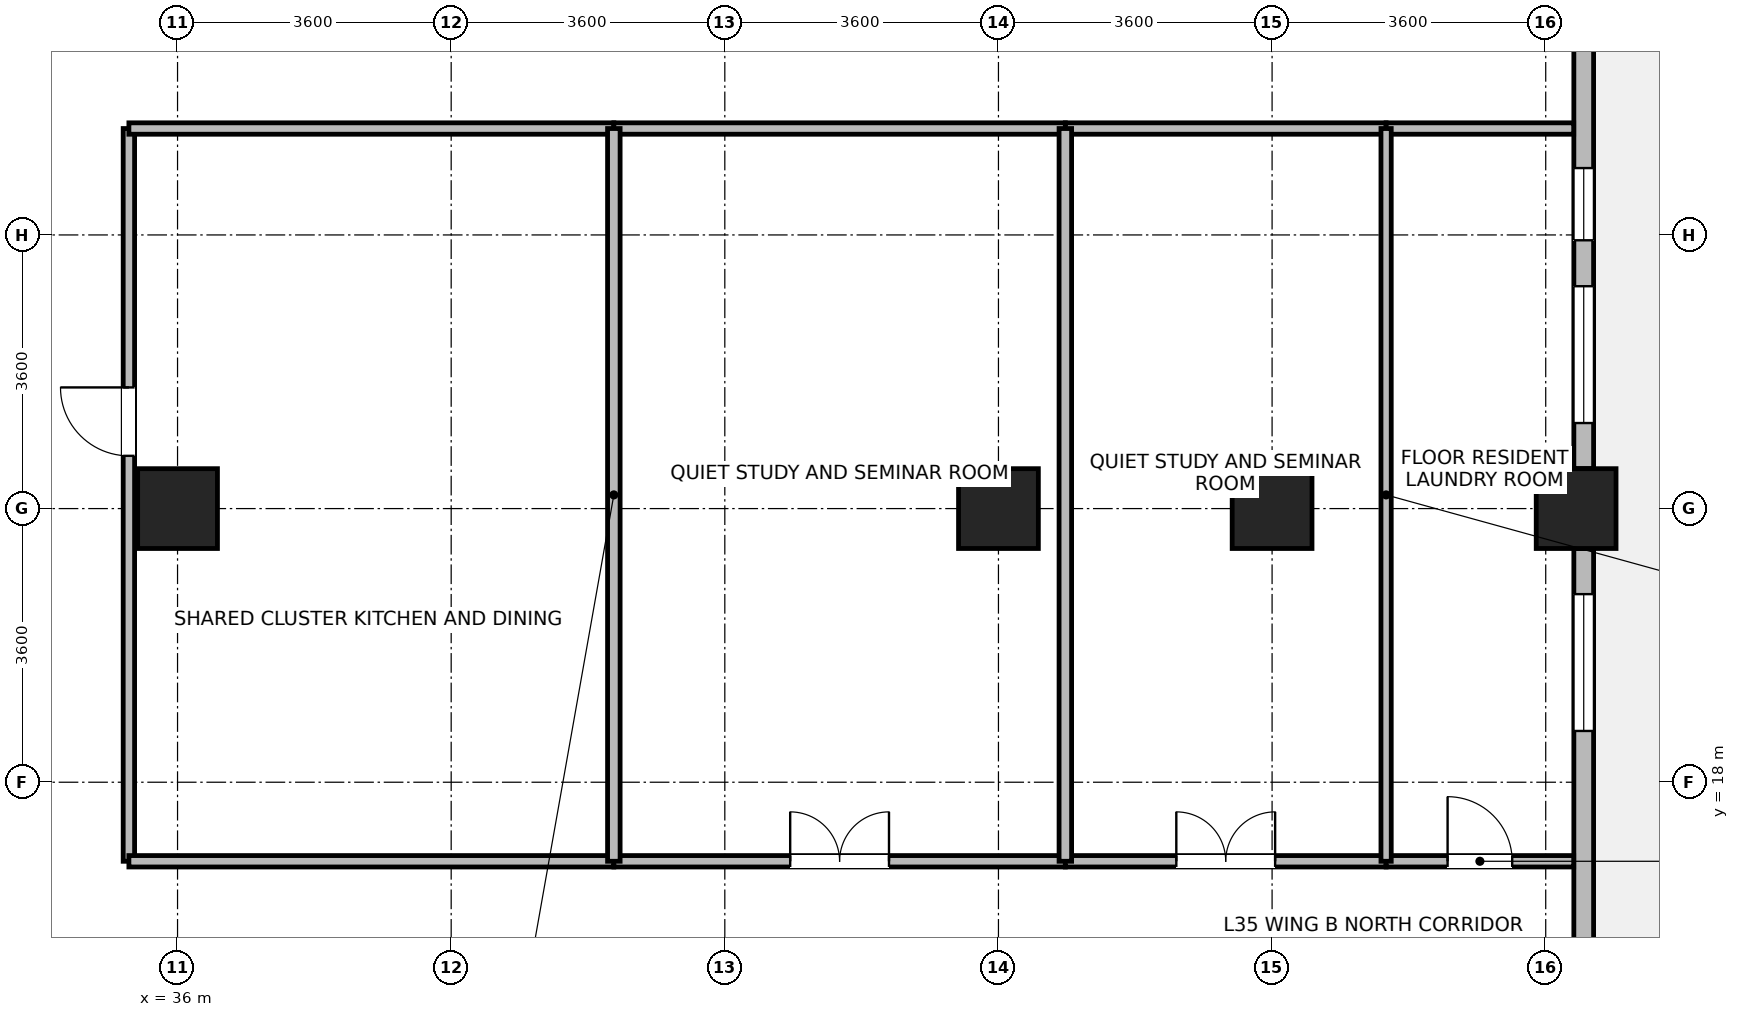
"""IFC4 building model, lengths in metres.
Left out: names, types, materials, properties, quantities, classifications, styles, units other than length and angle.
Written with IfcOpenShell. Run it as: python <this file> out.ifc"""

import sys

from ifc_helpers import new_model, si_unit, direction, frame, frame_2d, origin, origin_2d, place, context, subcontext, project, spatial, rectangle, extrude, source, transform, mapped, element, fill, save


model = new_model("IFC4")
c1 = context("Model", 3, precision=1e-05, world=origin(), true_north=direction((0.0, 1.0)))
c2 = subcontext(c1, "Body", "Model", "MODEL_VIEW")
j1 = project(units=[si_unit("LENGTHUNIT", "METRE"), si_unit("PLANEANGLEUNIT", "RADIAN")], contexts=[c1])
p1 = place(None, origin())
s1 = spatial("IfcSite", under=j1, at=p1, CompositionType="ELEMENT")
p2 = place(p1, origin())
s2 = spatial("IfcBuilding", under=s1, at=p2, CompositionType="ELEMENT")
p3 = place(p2, frame((0.0, 0.0, 140.2)))
s3 = spatial("IfcBuildingStorey", under=s2, at=p3, CompositionType="ELEMENT", Elevation=140.2)
m1 = source(origin(), c2, "Body", "SweptSolid", [
    extrude(rectangle(XDim=1.05, YDim=1.05, at=origin_2d()), origin(), (0.0, 0.0, 1.0), 3.7),
])
for number, where, z_axis, x_axis in (
    (1, (36.0, 21.6, 0.0), (0.0, 0.0, 1.0), (1.0, 0.0, 0.0)),
    (2, (46.8, 21.6, 0.0), (0.0, 0.0, 1.0), (1.0, 0.0, 0.0)),
    (3, (50.4, 21.6, 0.0), (0.0, 0.0, 1.0), (1.0, 0.0, 0.0)),
    (4, (54.4, 21.6, 0.0), (0.0, 0.0, 1.0), (1.0, 0.0, 0.0)),
):
    element("IfcColumn", number, at=place(p3, frame(where, z_axis=z_axis, x_axis=x_axis)), inside=s3, PredefinedType="COLUMN", context=c2, shape_type="MappedRepresentation", body=[
        mapped(m1, transform((0.0, 0.0, 0.0), x_axis=(1.0, 0.0, 0.0), y_axis=(0.0, 1.0, 0.0), z_axis=(0.0, 0.0, 1.0), scale=1.0)),
    ])
p4 = place(p3, frame((54.5, 21.074, 0.0), z_axis=(0.0, 0.0, 1.0), x_axis=(0.0, -1.0, 0.0)))
e5 = element("IfcWall", 5, at=p4, inside=s3, PredefinedType="STANDARD", context=c2, shape_type="SweptSolid", body=[
    extrude(rectangle(XDim=5.998, YDim=0.26, at=frame_2d((2.999, 0.0))), origin(), (0.0, 0.0, 1.0), 2.99),
])
p5 = place(p4, frame((0.6, 0.0, 0.85)))
e6 = element("IfcOpeningElement", 6, at=p5, cuts=e5, PredefinedType="OPENING", context=c2, shape_type="SweptSolid", body=[
    extrude(rectangle(XDim=1.8, YDim=1.85, at=frame_2d((0.9, 0.925))), frame((0.0, 0.14, 0.0), z_axis=(0.0, -1.0, 0.0), x_axis=(1.0, 0.0, 0.0)), (0.0, 0.0, 1.0), 0.28),
])
p6 = place(p3, frame((54.5, 28.124, 0.0), z_axis=(0.0, 0.0, 1.0), x_axis=(0.0, -1.0, 0.0)))
e7 = element("IfcWall", 7, at=p6, inside=s3, PredefinedType="STANDARD", context=c2, shape_type="SweptSolid", body=[
    extrude(rectangle(XDim=5.998, YDim=0.26, at=frame_2d((2.999, 0.0))), origin(), (0.0, 0.0, 1.0), 2.99),
])
p7 = place(p6, frame((3.598, 0.0, 0.85)))
e8 = element("IfcOpeningElement", 8, at=p7, cuts=e7, PredefinedType="OPENING", context=c2, shape_type="SweptSolid", body=[
    extrude(rectangle(XDim=1.8, YDim=1.85, at=frame_2d((0.9, 0.925))), frame((0.0, 0.14, 0.0), z_axis=(0.0, -1.0, 0.0), x_axis=(1.0, 0.0, 0.0)), (0.0, 0.0, 1.0), 0.28),
])
p8 = place(p6, frame((2.044, 0.0, 0.85)))
e9 = element("IfcOpeningElement", 9, at=p8, cuts=e7, PredefinedType="OPENING", context=c2, shape_type="SweptSolid", body=[
    extrude(rectangle(XDim=0.95, YDim=1.75, at=frame_2d((0.475, 0.875))), frame((0.0, 0.14, 0.0), z_axis=(0.0, -1.0, 0.0), x_axis=(1.0, 0.0, 0.0)), (0.0, 0.0, 1.0), 0.28),
])
p9 = place(p3, frame((35.36, 16.96, 0.0), z_axis=(0.0, 0.0, 1.0), x_axis=(0.0, 1.0, 0.0)))
e10 = element("IfcWall", 10, at=p9, inside=s3, PredefinedType="PARTITIONING", context=c2, shape_type="SweptSolid", body=[
    extrude(rectangle(XDim=9.64, YDim=0.15, at=frame_2d((4.82, 0.0))), origin(), (0.0, 0.0, 1.0), 3.44),
])
p10 = place(p9, frame((5.334, 0.0, 0.0)))
e11 = element("IfcOpeningElement", 11, at=p10, cuts=e10, PredefinedType="OPENING", context=c2, shape_type="SweptSolid", body=[
    extrude(rectangle(XDim=0.9, YDim=2.08, at=frame_2d((0.45, 1.04))), frame((0.0, 0.085, 0.0), z_axis=(0.0, -1.0, 0.0), x_axis=(1.0, 0.0, 0.0)), (0.0, 0.0, 1.0), 0.17),
])
for number, where, z_axis, x_axis in (
    (12, (35.36, 16.96, 0.0), (0.0, 0.0, 1.0), (1.0, 0.0, 0.0)),
    (13, (35.36, 26.6, 0.0), (0.0, 0.0, 1.0), (1.0, 0.0, 0.0)),
):
    element("IfcWall", number, at=place(p3, frame(where, z_axis=z_axis, x_axis=x_axis)), inside=s3, PredefinedType="PARTITIONING", context=c2, shape_type="SweptSolid", body=[
        extrude(rectangle(XDim=6.38, YDim=0.15, at=frame_2d((3.19, 0.0))), origin(), (0.0, 0.0, 1.0), 3.44),
    ])
p11 = place(p3, frame((41.74, 16.96, 0.0), z_axis=(0.0, 0.0, 1.0), x_axis=(1.0, 0.0, 0.0)))
e14 = element("IfcWall", 14, at=p11, inside=s3, PredefinedType="PARTITIONING", context=c2, shape_type="SweptSolid", body=[
    extrude(rectangle(XDim=5.94, YDim=0.15, at=frame_2d((2.97, 0.0))), origin(), (0.0, 0.0, 1.0), 3.44),
])
p12 = place(p11, frame((2.32, 0.0, 0.0)))
e15 = element("IfcOpeningElement", 15, at=p12, cuts=e14, PredefinedType="OPENING", context=c2, shape_type="SweptSolid", body=[
    extrude(rectangle(XDim=1.3, YDim=2.12, at=frame_2d((0.65, 1.06))), frame((0.0, 0.085, 0.0), z_axis=(0.0, -1.0, 0.0), x_axis=(1.0, 0.0, 0.0)), (0.0, 0.0, 1.0), 0.17),
])
p13 = place(p3, frame((41.74, 26.6, 0.0), z_axis=(0.0, 0.0, 1.0), x_axis=(1.0, 0.0, 0.0)))
e16 = element("IfcWall", 16, at=p13, inside=s3, PredefinedType="PARTITIONING", context=c2, shape_type="SweptSolid", body=[
    extrude(rectangle(XDim=5.94, YDim=0.15, at=frame_2d((2.97, 0.0))), origin(), (0.0, 0.0, 1.0), 3.44),
])
p14 = place(p3, frame((47.68, 16.96, 0.0), z_axis=(0.0, 0.0, 1.0), x_axis=(1.0, 0.0, 0.0)))
e17 = element("IfcWall", 17, at=p14, inside=s3, PredefinedType="PARTITIONING", context=c2, shape_type="SweptSolid", body=[
    extrude(rectangle(XDim=4.22, YDim=0.15, at=frame_2d((2.11, 0.0))), origin(), (0.0, 0.0, 1.0), 3.44),
])
p15 = place(p14, frame((1.46, 0.0, 0.0)))
e18 = element("IfcOpeningElement", 18, at=p15, cuts=e17, PredefinedType="OPENING", context=c2, shape_type="SweptSolid", body=[
    extrude(rectangle(XDim=1.3, YDim=2.12, at=frame_2d((0.65, 1.06))), frame((0.0, 0.085, 0.0), z_axis=(0.0, -1.0, 0.0), x_axis=(1.0, 0.0, 0.0)), (0.0, 0.0, 1.0), 0.17),
])
p16 = place(p3, frame((47.68, 26.6, 0.0), z_axis=(0.0, 0.0, 1.0), x_axis=(1.0, 0.0, 0.0)))
e19 = element("IfcWall", 19, at=p16, inside=s3, PredefinedType="PARTITIONING", context=c2, shape_type="SweptSolid", body=[
    extrude(rectangle(XDim=4.22, YDim=0.15, at=frame_2d((2.11, 0.0))), origin(), (0.0, 0.0, 1.0), 3.44),
])
p17 = place(p3, frame((51.9, 16.96, 0.0), z_axis=(0.0, 0.0, 1.0), x_axis=(1.0, 0.0, 0.0)))
e20 = element("IfcWall", 20, at=p17, inside=s3, PredefinedType="PARTITIONING", context=c2, shape_type="SweptSolid", body=[
    extrude(rectangle(XDim=2.468, YDim=0.15, at=frame_2d((1.234, 0.0))), origin(), (0.0, 0.0, 1.0), 3.44),
])
p18 = place(p17, frame((0.809, 0.0, 0.0)))
e21 = element("IfcOpeningElement", 21, at=p18, cuts=e20, PredefinedType="OPENING", context=c2, shape_type="SweptSolid", body=[
    extrude(rectangle(XDim=0.85, YDim=2.04, at=frame_2d((0.425, 1.02))), frame((0.0, 0.085, 0.0), z_axis=(0.0, -1.0, 0.0), x_axis=(1.0, 0.0, 0.0)), (0.0, 0.0, 1.0), 0.17),
])
p19 = place(p3, frame((51.9, 26.6, 0.0), z_axis=(0.0, 0.0, 1.0), x_axis=(1.0, 0.0, 0.0)))
e22 = element("IfcWall", 22, at=p19, inside=s3, PredefinedType="PARTITIONING", context=c2, shape_type="SweptSolid", body=[
    extrude(rectangle(XDim=2.468, YDim=0.15, at=frame_2d((1.234, 0.0))), origin(), (0.0, 0.0, 1.0), 3.44),
])
for number, where, z_axis, x_axis in (
    (23, (41.74, 16.96, 0.0), (0.0, 0.0, 1.0), (0.0, 1.0, 0.0)),
    (24, (47.68, 16.96, 0.0), (0.0, 0.0, 1.0), (0.0, 1.0, 0.0)),
):
    element("IfcWall", number, at=place(p3, frame(where, z_axis=z_axis, x_axis=x_axis)), inside=s3, PredefinedType="PARTITIONING", context=c2, shape_type="SweptSolid", body=[
        extrude(rectangle(XDim=9.64, YDim=0.165, at=frame_2d((4.82, 0.0))), origin(), (0.0, 0.0, 1.0), 3.44),
    ])
p20 = place(p3, frame((51.9, 16.96, 0.0), z_axis=(0.0, 0.0, 1.0), x_axis=(0.0, 1.0, 0.0)))
e25 = element("IfcWall", 25, at=p20, inside=s3, PredefinedType="PARTITIONING", context=c2, shape_type="SweptSolid", body=[
    extrude(rectangle(XDim=9.64, YDim=0.135, at=frame_2d((4.82, 0.0))), origin(), (0.0, 0.0, 1.0), 3.44),
])
p21 = place(p5, origin())
e26 = element("IfcWindow", 26, at=p21, inside=s3, PartitioningType="SINGLE_PANEL", PredefinedType="WINDOW", context=c2, shape_type="SweptSolid", body=[
    extrude(rectangle(XDim=1.8, YDim=1.85, at=frame_2d((0.9, 0.925))), frame((0.0, 0.03, 0.0), z_axis=(0.0, -1.0, 0.0), x_axis=(1.0, 0.0, 0.0)), (0.0, 0.0, 1.0), 0.06),
])
fill(e6, e26)
p22 = place(p7, origin())
e27 = element("IfcWindow", 27, at=p22, inside=s3, PartitioningType="SINGLE_PANEL", PredefinedType="WINDOW", context=c2, shape_type="SweptSolid", body=[
    extrude(rectangle(XDim=1.8, YDim=1.85, at=frame_2d((0.9, 0.925))), frame((0.0, 0.03, 0.0), z_axis=(0.0, -1.0, 0.0), x_axis=(1.0, 0.0, 0.0)), (0.0, 0.0, 1.0), 0.06),
])
fill(e8, e27)
p23 = place(p8, origin())
e28 = element("IfcWindow", 28, at=p23, inside=s3, PartitioningType="SINGLE_PANEL", PredefinedType="WINDOW", context=c2, shape_type="SweptSolid", body=[
    extrude(rectangle(XDim=0.95, YDim=1.75, at=frame_2d((0.475, 0.875))), frame((0.0, 0.03, 0.0), z_axis=(0.0, -1.0, 0.0), x_axis=(1.0, 0.0, 0.0)), (0.0, 0.0, 1.0), 0.06),
])
fill(e9, e28)
p24 = place(p10, origin())
e29 = element("IfcDoor", 29, at=p24, inside=s3, OperationType="SINGLE_SWING_RIGHT", PredefinedType="DOOR", context=c2, shape_type="SweptSolid", body=[
    extrude(rectangle(XDim=0.9, YDim=2.08, at=frame_2d((0.45, 1.04))), frame((0.0, 0.025, 0.0), z_axis=(0.0, -1.0, 0.0), x_axis=(1.0, 0.0, 0.0)), (0.0, 0.0, 1.0), 0.05),
])
fill(e11, e29)
p25 = place(p12, origin())
e30 = element("IfcDoor", 30, at=p25, inside=s3, OperationType="DOUBLE_DOOR_SINGLE_SWING", PredefinedType="DOOR", context=c2, shape_type="SweptSolid", body=[
    extrude(rectangle(XDim=1.3, YDim=2.12, at=frame_2d((0.65, 1.06))), frame((0.0, 0.025, 0.0), z_axis=(0.0, -1.0, 0.0), x_axis=(1.0, 0.0, 0.0)), (0.0, 0.0, 1.0), 0.05),
])
fill(e15, e30)
p26 = place(p15, origin())
e31 = element("IfcDoor", 31, at=p26, inside=s3, OperationType="DOUBLE_DOOR_SINGLE_SWING", PredefinedType="DOOR", context=c2, shape_type="SweptSolid", body=[
    extrude(rectangle(XDim=1.3, YDim=2.12, at=frame_2d((0.65, 1.06))), frame((0.0, 0.025, 0.0), z_axis=(0.0, -1.0, 0.0), x_axis=(1.0, 0.0, 0.0)), (0.0, 0.0, 1.0), 0.05),
])
fill(e18, e31)
p27 = place(p18, origin())
e32 = element("IfcDoor", 32, at=p27, inside=s3, OperationType="SINGLE_SWING_LEFT", PredefinedType="DOOR", context=c2, shape_type="SweptSolid", body=[
    extrude(rectangle(XDim=0.85, YDim=2.04, at=frame_2d((0.425, 1.02))), frame((0.0, 0.025, 0.0), z_axis=(0.0, -1.0, 0.0), x_axis=(1.0, 0.0, 0.0)), (0.0, 0.0, 1.0), 0.05),
])
fill(e21, e32)
save(model, sys.argv[1])
